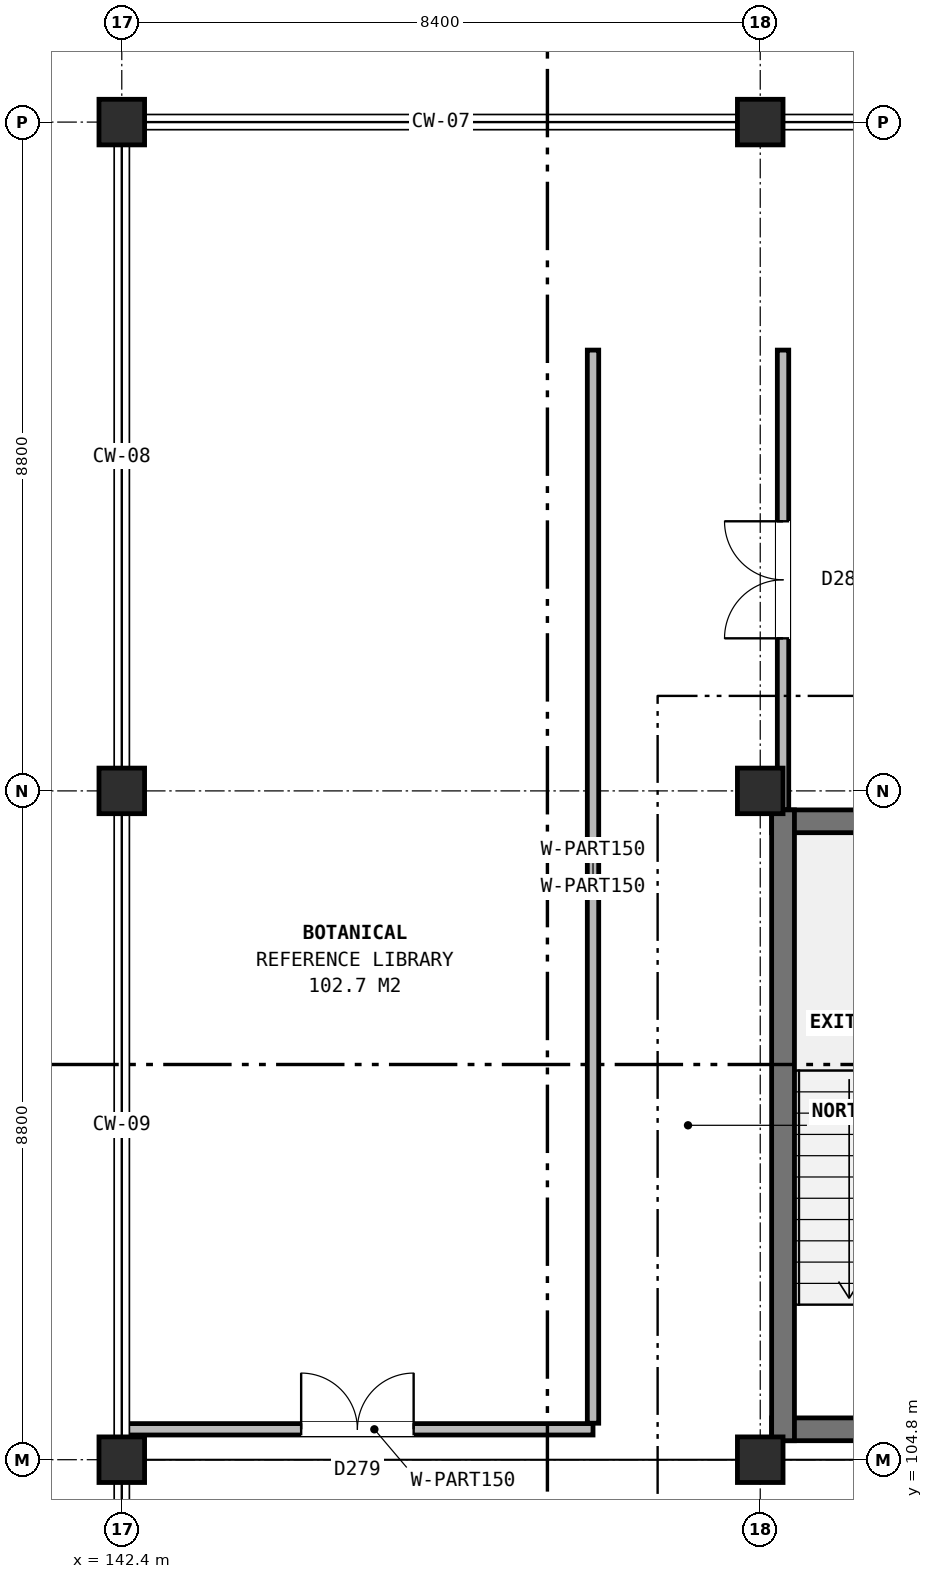
"""IFC4 building model, lengths in metres.
Left out: names, types, materials, properties, quantities, classifications, styles, units other than length and angle.
Written with IfcOpenShell. Run it as: python <this file> out.ifc"""

import sys

from ifc_helpers import new_model, si_unit, direction, frame, frame_2d, origin, origin_2d, place, context, subcontext, project, spatial, rectangle, extrude, element, fill, save


model = new_model("IFC4")
c1 = context("Model", 3, precision=1e-05, world=origin(), true_north=direction((0.0, 1.0)))
c2 = subcontext(c1, "Body", "Model", "MODEL_VIEW")
j1 = project(units=[si_unit("LENGTHUNIT", "METRE"), si_unit("PLANEANGLEUNIT", "RADIAN")], contexts=[c1])
p1 = place(None, origin())
s1 = spatial("IfcSite", under=j1, at=p1, CompositionType="ELEMENT")
p2 = place(p1, origin())
s2 = spatial("IfcBuilding", under=s1, at=p2, CompositionType="ELEMENT")
p3 = place(p2, frame((0.0, 0.0, 59.8)))
s3 = spatial("IfcBuildingStorey", under=s2, at=p3, CompositionType="ELEMENT", Elevation=59.8)
for number, where, z_axis, x_axis in (
    (1, (142.4, 104.8, 0.0), (0.0, 0.0, 1.0), (1.0, 0.0, 0.0)),
    (2, (142.4, 113.6, 0.0), (0.0, 0.0, 1.0), (1.0, 0.0, 0.0)),
    (3, (142.4, 122.4, 0.0), (0.0, 0.0, 1.0), (1.0, 0.0, 0.0)),
    (4, (150.8, 104.8, 0.0), (0.0, 0.0, 1.0), (1.0, 0.0, 0.0)),
    (5, (150.8, 113.6, 0.0), (0.0, 0.0, 1.0), (1.0, 0.0, 0.0)),
    (6, (150.8, 122.4, 0.0), (0.0, 0.0, 1.0), (1.0, 0.0, 0.0)),
):
    element("IfcColumn", number, at=place(p3, frame(where, z_axis=z_axis, x_axis=x_axis)), inside=s3, PredefinedType="COLUMN", context=c2, shape_type="SweptSolid", body=[
        extrude(rectangle(XDim=0.6, YDim=0.6, at=origin_2d()), origin(), (0.0, 0.0, 1.0), 4.0),
    ])
for number, where, z_axis, x_axis in (
    (7, (150.95, 105.2, 0.0), (0.0, 0.0, 1.0), (1.0, 0.0, 0.0)),
    (8, (150.95, 113.2, 0.0), (0.0, 0.0, 1.0), (1.0, 0.0, 0.0)),
):
    element("IfcWall", number, at=place(p3, frame(where, z_axis=z_axis, x_axis=x_axis)), inside=s3, PredefinedType="SHEAR", context=c2, shape_type="SweptSolid", body=[
        extrude(rectangle(XDim=3.6, YDim=0.3, at=frame_2d((1.8, 0.0))), origin(), (0.0, 0.0, 1.0), 4.0),
    ])
p4 = place(p3, frame((151.1, 105.05, 0.0), z_axis=(0.0, 0.0, 1.0), x_axis=(0.0, 1.0, 0.0)))
e9 = element("IfcWall", 9, at=p4, inside=s3, PredefinedType="SHEAR", context=c2, shape_type="SweptSolid", body=[
    extrude(rectangle(XDim=8.3, YDim=0.3, at=frame_2d((4.15, 0.0))), origin(), (0.0, 0.0, 1.0), 4.0),
])
p5 = place(p3, frame((142.4, 105.2, 0.0), z_axis=(0.0, 0.0, 1.0), x_axis=(1.0, 0.0, 0.0)))
e10 = element("IfcWall", 10, at=p5, inside=s3, PredefinedType="PARTITIONING", context=c2, shape_type="SweptSolid", body=[
    extrude(rectangle(XDim=6.2, YDim=0.15, at=frame_2d((3.1, 0.0))), origin(), (0.0, 0.0, 1.0), 3.245),
])
p6 = place(p5, frame((2.36, 0.0, 0.0)))
e11 = element("IfcOpeningElement", 11, at=p6, cuts=e10, PredefinedType="OPENING", context=c2, shape_type="SweptSolid", body=[
    extrude(rectangle(XDim=1.48, YDim=2.2, at=frame_2d((0.74, 1.1))), frame((0.0, 0.085, 0.0), z_axis=(0.0, -1.0, 0.0), x_axis=(1.0, 0.0, 0.0)), (0.0, 0.0, 1.0), 0.17),
])
p7 = place(p3, frame((148.6, 105.28, 0.0), z_axis=(0.0, 0.0, 1.0), x_axis=(0.0, 1.0, 0.0)))
e12 = element("IfcWall", 12, at=p7, inside=s3, PredefinedType="PARTITIONING", context=c2, shape_type="SweptSolid", body=[
    extrude(rectangle(XDim=14.12, YDim=0.15, at=frame_2d((7.06, 0.0))), origin(), (0.0, 0.0, 1.0), 3.665),
])
p8 = place(p3, frame((151.1, 113.355, 0.0), z_axis=(0.0, 0.0, 1.0), x_axis=(0.0, 1.0, 0.0)))
e13 = element("IfcWall", 13, at=p8, inside=s3, PredefinedType="PARTITIONING", context=c2, shape_type="SweptSolid", body=[
    extrude(rectangle(XDim=6.045, YDim=0.15, at=frame_2d((3.022, 0.0))), origin(), (0.0, 0.0, 1.0), 3.245),
])
p9 = place(p8, frame((2.252, 0.0, 0.0)))
e14 = element("IfcOpeningElement", 14, at=p9, cuts=e13, PredefinedType="OPENING", context=c2, shape_type="SweptSolid", body=[
    extrude(rectangle(XDim=1.54, YDim=2.3, at=frame_2d((0.77, 1.15))), frame((0.0, 0.085, 0.0), z_axis=(0.0, -1.0, 0.0), x_axis=(1.0, 0.0, 0.0)), (0.0, 0.0, 1.0), 0.17),
])
p10 = place(p6, origin())
e15 = element("IfcDoor", 15, at=p10, inside=s3, OperationType="DOUBLE_DOOR_SINGLE_SWING", PredefinedType="DOOR", context=c2, shape_type="SweptSolid", body=[
    extrude(rectangle(XDim=1.48, YDim=2.2, at=frame_2d((0.74, 1.1))), frame((0.0, 0.025, 0.0), z_axis=(0.0, -1.0, 0.0), x_axis=(1.0, 0.0, 0.0)), (0.0, 0.0, 1.0), 0.05),
])
fill(e11, e15)
p11 = place(p9, origin())
e16 = element("IfcDoor", 16, at=p11, inside=s3, OperationType="DOUBLE_DOOR_SINGLE_SWING", PredefinedType="DOOR", context=c2, shape_type="SweptSolid", body=[
    extrude(rectangle(XDim=1.54, YDim=2.3, at=frame_2d((0.77, 1.15))), frame((0.0, 0.025, 0.0), z_axis=(0.0, -1.0, 0.0), x_axis=(1.0, 0.0, 0.0)), (0.0, 0.0, 1.0), 0.05),
])
fill(e14, e16)
save(model, sys.argv[1])
